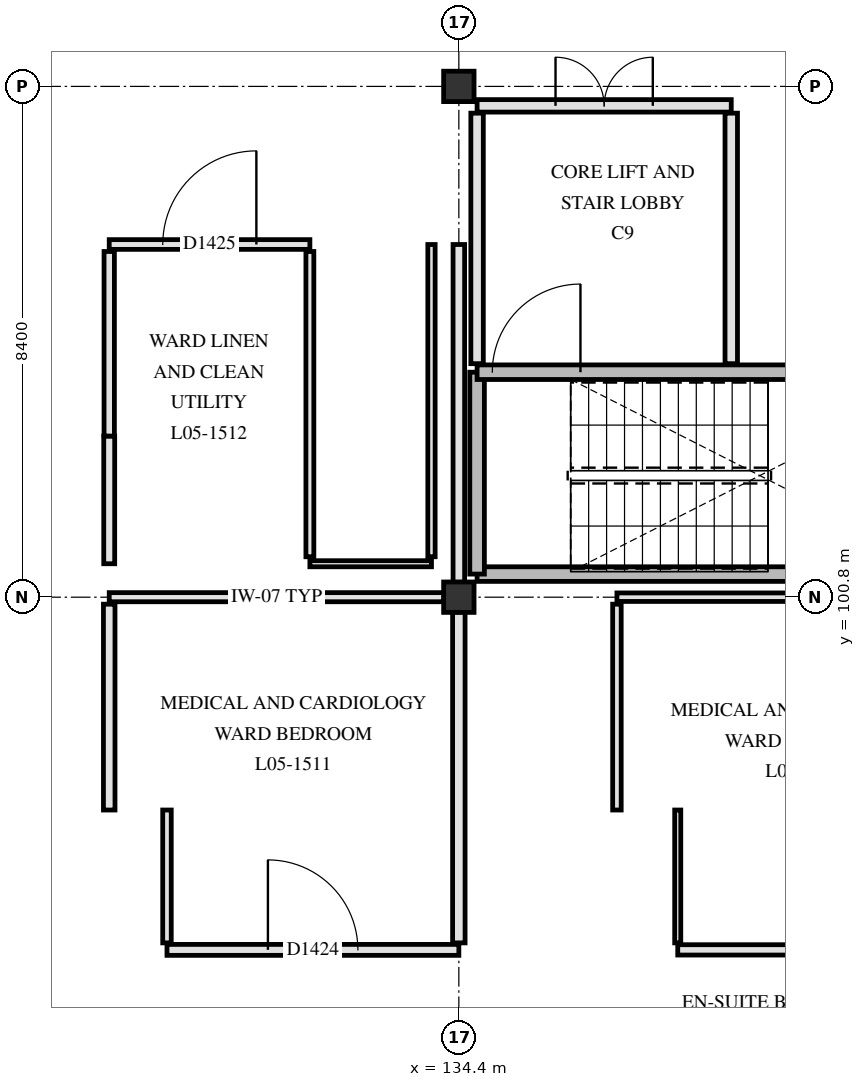
"""IFC4 building model, lengths in metres.
Left out: names, types, materials, properties, quantities, classifications, styles, units other than length and angle.
Written with IfcOpenShell. Run it as: python <this file> out.ifc"""

import sys

from ifc_helpers import new_model, si_unit, direction, frame, frame_2d, origin, origin_2d, place, context, subcontext, project, spatial, rectangle, extrude, element, fill, save


model = new_model("IFC4")
c1 = context("Model", 3, precision=1e-05, world=origin(), true_north=direction((0.0, 1.0)))
c2 = subcontext(c1, "Body", "Model", "MODEL_VIEW")
j1 = project(units=[si_unit("LENGTHUNIT", "METRE"), si_unit("PLANEANGLEUNIT", "RADIAN")], contexts=[c1])
p1 = place(None, origin())
s1 = spatial("IfcSite", under=j1, at=p1, CompositionType="ELEMENT")
p2 = place(p1, origin())
s2 = spatial("IfcBuilding", under=s1, at=p2, CompositionType="ELEMENT")
p3 = place(p2, frame((0.0, 0.0, 22.5)))
s3 = spatial("IfcBuildingStorey", under=s2, at=p3, CompositionType="ELEMENT", Elevation=22.5)
for number, where, z_axis, x_axis in (
    (1, (134.4, 100.8, 0.0), (0.0, 0.0, 1.0), (1.0, 0.0, 0.0)),
    (2, (134.4, 109.2, 0.0), (0.0, 0.0, 1.0), (1.0, 0.0, 0.0)),
):
    element("IfcColumn", number, at=place(p3, frame(where, z_axis=z_axis, x_axis=x_axis)), inside=s3, PredefinedType="COLUMN", context=c2, shape_type="SweptSolid", body=[
        extrude(rectangle(XDim=0.5, YDim=0.5, at=origin_2d()), origin(), (0.0, 0.0, 1.0), 3.9),
    ])
p4 = place(p3, frame((134.7, 101.18, 0.0), z_axis=(0.0, 0.0, 1.0), x_axis=(1.0, 0.0, 0.0)))
e3 = element("IfcWall", 3, at=p4, inside=s3, PredefinedType="SHEAR", context=c2, shape_type="SweptSolid", body=[
    extrude(rectangle(XDim=7.82, YDim=0.24, at=frame_2d((3.91, 0.0))), origin(), (0.0, 0.0, 1.0), 3.62),
])
p5 = place(p3, frame((134.7, 101.18, 0.0), z_axis=(0.0, 0.0, 1.0), x_axis=(0.0, 1.0, 0.0)))
e4 = element("IfcWall", 4, at=p5, inside=s3, PredefinedType="SHEAR", context=c2, shape_type="SweptSolid", body=[
    extrude(rectangle(XDim=3.32, YDim=0.24, at=frame_2d((1.66, 0.0))), origin(), (0.0, 0.0, 1.0), 3.62),
])
p6 = place(p3, frame((134.7, 104.5, 0.0), z_axis=(0.0, 0.0, 1.0), x_axis=(1.0, 0.0, 0.0)))
e5 = element("IfcWall", 5, at=p6, inside=s3, PredefinedType="SHEAR", context=c2, shape_type="SweptSolid", body=[
    extrude(rectangle(XDim=7.82, YDim=0.24, at=frame_2d((3.91, 0.0))), origin(), (0.0, 0.0, 1.0), 3.62),
])
p7 = place(p6, frame((0.25, 0.0, 0.0)))
e6 = element("IfcOpeningElement", 6, at=p7, cuts=e5, PredefinedType="OPENING", context=c2, shape_type="SweptSolid", body=[
    extrude(rectangle(XDim=1.45, YDim=2.2, at=frame_2d((0.725, 1.1))), frame((0.0, 0.13, 0.0), z_axis=(0.0, -1.0, 0.0), x_axis=(1.0, 0.0, 0.0)), (0.0, 0.0, 1.0), 0.26),
])
for number, where, z_axis, x_axis in (
    (7, (138.88, 104.64, 0.0), (0.0, 0.0, 1.0), (0.0, 1.0, 0.0)),
    (8, (134.7, 104.64, 0.0), (0.0, 0.0, 1.0), (0.0, 1.0, 0.0)),
):
    element("IfcWall", number, at=place(p3, frame(where, z_axis=z_axis, x_axis=x_axis)), inside=s3, PredefinedType="PARTITIONING", context=c2, shape_type="SweptSolid", body=[
        extrude(rectangle(XDim=4.12, YDim=0.205, at=frame_2d((2.06, 0.0))), origin(), (0.0, 0.0, 1.0), 3.61),
    ])
p8 = place(p3, frame((134.7, 108.88, 0.0), z_axis=(0.0, 0.0, 1.0), x_axis=(1.0, 0.0, 0.0)))
e9 = element("IfcWall", 9, at=p8, inside=s3, PredefinedType="PARTITIONING", context=c2, shape_type="SweptSolid", body=[
    extrude(rectangle(XDim=4.18, YDim=0.205, at=frame_2d((2.09, 0.0))), origin(), (0.0, 0.0, 1.0), 3.61),
])
p9 = place(p8, frame((1.29, 0.0, 0.0)))
e10 = element("IfcOpeningElement", 10, at=p9, cuts=e9, PredefinedType="OPENING", context=c2, shape_type="SweptSolid", body=[
    extrude(rectangle(XDim=1.6, YDim=2.25, at=frame_2d((0.8, 1.125))), frame((0.0, 0.113, 0.0), z_axis=(0.0, -1.0, 0.0), x_axis=(1.0, 0.0, 0.0)), (0.0, 0.0, 1.0), 0.225),
])
p10 = place(p3, frame((129.6, 95.0, 0.0), z_axis=(0.0, 0.0, 1.0), x_axis=(1.0, 0.0, 0.0)))
e11 = element("IfcWall", 11, at=p10, inside=s3, PredefinedType="PARTITIONING", context=c2, shape_type="SweptSolid", body=[
    extrude(rectangle(XDim=4.8, YDim=0.18, at=frame_2d((2.4, 0.0))), origin(), (0.0, 0.0, 1.0), 3.3),
])
p11 = place(p10, frame((1.66, 0.0, 0.0)))
e12 = element("IfcOpeningElement", 12, at=p11, cuts=e11, PredefinedType="OPENING", context=c2, shape_type="SweptSolid", body=[
    extrude(rectangle(XDim=1.48, YDim=2.22, at=frame_2d((0.74, 1.11))), frame((0.0, 0.1, 0.0), z_axis=(0.0, -1.0, 0.0), x_axis=(1.0, 0.0, 0.0)), (0.0, 0.0, 1.0), 0.2),
])
p12 = place(p3, frame((138.0, 95.0, 0.0), z_axis=(0.0, 0.0, 1.0), x_axis=(1.0, 0.0, 0.0)))
e13 = element("IfcWall", 13, at=p12, inside=s3, PredefinedType="PARTITIONING", context=c2, shape_type="SweptSolid", body=[
    extrude(rectangle(XDim=4.8, YDim=0.17, at=frame_2d((2.4, 0.0))), origin(), (0.0, 0.0, 1.0), 3.3),
])
p13 = place(p12, frame((1.79, 0.0, 0.0)))
e14 = element("IfcOpeningElement", 14, at=p13, cuts=e13, PredefinedType="OPENING", context=c2, shape_type="SweptSolid", body=[
    extrude(rectangle(XDim=1.22, YDim=2.18, at=frame_2d((0.61, 1.09))), frame((0.0, 0.095, 0.0), z_axis=(0.0, -1.0, 0.0), x_axis=(1.0, 0.0, 0.0)), (0.0, 0.0, 1.0), 0.19),
])
p14 = place(p3, frame((128.65, 100.8, 0.0), z_axis=(0.0, 0.0, 1.0), x_axis=(1.0, 0.0, 0.0)))
e15 = element("IfcWall", 15, at=p14, inside=s3, PredefinedType="PARTITIONING", context=c2, shape_type="SweptSolid", body=[
    extrude(rectangle(XDim=5.505, YDim=0.15, at=frame_2d((2.752, 0.0))), origin(), (0.0, 0.0, 1.0), 3.16),
])
p15 = place(p3, frame((137.0, 100.8, 0.0), z_axis=(0.0, 0.0, 1.0), x_axis=(1.0, 0.0, 0.0)))
e16 = element("IfcWall", 16, at=p15, inside=s3, PredefinedType="PARTITIONING", context=c2, shape_type="SweptSolid", body=[
    extrude(rectangle(XDim=5.555, YDim=0.14, at=frame_2d((2.777, 0.0))), origin(), (0.0, 0.0, 1.0), 3.16),
])
p16 = place(p3, frame((131.95, 101.35, 0.0), z_axis=(0.0, 0.0, 1.0), x_axis=(1.0, 0.0, 0.0)))
e17 = element("IfcWall", 17, at=p16, inside=s3, PredefinedType="PARTITIONING", context=c2, shape_type="SweptSolid", body=[
    extrude(rectangle(XDim=2.0, YDim=0.1, at=frame_2d((1.0, 0.0))), origin(), (0.0, 0.0, 1.0), 3.61),
])
p17 = place(p3, frame((128.65, 106.6, 0.0), z_axis=(0.0, 0.0, 1.0), x_axis=(1.0, 0.0, 0.0)))
e18 = element("IfcWall", 18, at=p17, inside=s3, PredefinedType="PARTITIONING", context=c2, shape_type="SweptSolid", body=[
    extrude(rectangle(XDim=3.3, YDim=0.16, at=frame_2d((1.65, 0.0))), origin(), (0.0, 0.0, 1.0), 3.61),
])
p18 = place(p17, frame((0.88, 0.0, 0.0)))
e19 = element("IfcOpeningElement", 19, at=p18, cuts=e18, PredefinedType="OPENING", context=c2, shape_type="SweptSolid", body=[
    extrude(rectangle(XDim=1.54, YDim=2.24, at=frame_2d((0.77, 1.12))), frame((0.0, 0.09, 0.0), z_axis=(0.0, -1.0, 0.0), x_axis=(1.0, 0.0, 0.0)), (0.0, 0.0, 1.0), 0.18),
])
p19 = place(p3, frame((128.65, 97.3, 0.0), z_axis=(0.0, 0.0, 1.0), x_axis=(0.0, 1.0, 0.0)))
e20 = element("IfcWall", 20, at=p19, inside=s3, PredefinedType="PARTITIONING", context=c2, shape_type="SweptSolid", body=[
    extrude(rectangle(XDim=3.385, YDim=0.19, at=frame_2d((1.692, 0.0))), origin(), (0.0, 0.0, 1.0), 3.34),
])
p20 = place(p3, frame((128.65, 101.35, 0.0), z_axis=(0.0, 0.0, 1.0), x_axis=(0.0, 1.0, 0.0)))
e21 = element("IfcWall", 21, at=p20, inside=s3, PredefinedType="PARTITIONING", context=c2, shape_type="SweptSolid", body=[
    extrude(rectangle(XDim=2.1, YDim=0.18, at=frame_2d((1.05, 0.0))), origin(), (0.0, 0.0, 1.0), 3.61),
])
p21 = place(p3, frame((128.65, 103.45, 0.0), z_axis=(0.0, 0.0, 1.0), x_axis=(0.0, 1.0, 0.0)))
e22 = element("IfcWall", 22, at=p21, inside=s3, PredefinedType="PARTITIONING", context=c2, shape_type="SweptSolid", body=[
    extrude(rectangle(XDim=3.035, YDim=0.17, at=frame_2d((1.518, 0.0))), origin(), (0.0, 0.0, 1.0), 3.34),
])
p22 = place(p3, frame((129.6, 95.115, 0.0), z_axis=(0.0, 0.0, 1.0), x_axis=(0.0, 1.0, 0.0)))
e23 = element("IfcWall", 23, at=p22, inside=s3, PredefinedType="PARTITIONING", context=c2, shape_type="SweptSolid", body=[
    extrude(rectangle(XDim=2.185, YDim=0.14, at=frame_2d((1.093, 0.0))), origin(), (0.0, 0.0, 1.0), 3.34),
])
p23 = place(p3, frame((131.95, 101.465, 0.0), z_axis=(0.0, 0.0, 1.0), x_axis=(0.0, 1.0, 0.0)))
e24 = element("IfcWall", 24, at=p23, inside=s3, PredefinedType="PARTITIONING", context=c2, shape_type="SweptSolid", body=[
    extrude(rectangle(XDim=5.02, YDim=0.13, at=frame_2d((2.51, 0.0))), origin(), (0.0, 0.0, 1.0), 3.34),
])
p24 = place(p3, frame((133.95, 101.465, 0.0), z_axis=(0.0, 0.0, 1.0), x_axis=(0.0, 1.0, 0.0)))
e25 = element("IfcWall", 25, at=p24, inside=s3, PredefinedType="PARTITIONING", context=c2, shape_type="SweptSolid", body=[
    extrude(rectangle(XDim=5.135, YDim=0.12, at=frame_2d((2.567, 0.0))), origin(), (0.0, 0.0, 1.0), 3.34),
])
p25 = place(p3, frame((134.4, 95.115, 0.0), z_axis=(0.0, 0.0, 1.0), x_axis=(0.0, 1.0, 0.0)))
e26 = element("IfcWall", 26, at=p25, inside=s3, PredefinedType="PARTITIONING", context=c2, shape_type="SweptSolid", body=[
    extrude(rectangle(XDim=5.44, YDim=0.205, at=frame_2d((2.72, 0.0))), origin(), (0.0, 0.0, 1.0), 3.3),
])
p26 = place(p3, frame((134.4, 101.045, 0.0), z_axis=(0.0, 0.0, 1.0), x_axis=(0.0, 1.0, 0.0)))
e27 = element("IfcWall", 27, at=p26, inside=s3, PredefinedType="PARTITIONING", context=c2, shape_type="SweptSolid", body=[
    extrude(rectangle(XDim=5.555, YDim=0.19, at=frame_2d((2.778, 0.0))), origin(), (0.0, 0.0, 1.0), 3.3),
])
p27 = place(p3, frame((137.0, 97.3, 0.0), z_axis=(0.0, 0.0, 1.0), x_axis=(0.0, 1.0, 0.0)))
e28 = element("IfcWall", 28, at=p27, inside=s3, PredefinedType="PARTITIONING", context=c2, shape_type="SweptSolid", body=[
    extrude(rectangle(XDim=3.385, YDim=0.14, at=frame_2d((1.692, 0.0))), origin(), (0.0, 0.0, 1.0), 3.34),
])
p28 = place(p3, frame((138.0, 95.115, 0.0), z_axis=(0.0, 0.0, 1.0), x_axis=(0.0, 1.0, 0.0)))
e29 = element("IfcWall", 29, at=p28, inside=s3, PredefinedType="PARTITIONING", context=c2, shape_type="SweptSolid", body=[
    extrude(rectangle(XDim=2.185, YDim=0.1, at=frame_2d((1.093, 0.0))), origin(), (0.0, 0.0, 1.0), 3.34),
])
p29 = place(p7, origin())
e30 = element("IfcDoor", 30, at=p29, inside=s3, OperationType="SINGLE_SWING_RIGHT", PredefinedType="DOOR", context=c2, shape_type="SweptSolid", body=[
    extrude(rectangle(XDim=1.45, YDim=2.2, at=frame_2d((0.725, 1.1))), frame((0.0, 0.025, 0.0), z_axis=(0.0, -1.0, 0.0), x_axis=(1.0, 0.0, 0.0)), (0.0, 0.0, 1.0), 0.05),
])
fill(e6, e30)
p30 = place(p9, origin())
e31 = element("IfcDoor", 31, at=p30, inside=s3, OperationType="DOUBLE_SWING_LEFT", PredefinedType="DOOR", context=c2, shape_type="SweptSolid", body=[
    extrude(rectangle(XDim=1.6, YDim=2.25, at=frame_2d((0.8, 1.125))), frame((0.0, 0.025, 0.0), z_axis=(0.0, -1.0, 0.0), x_axis=(1.0, 0.0, 0.0)), (0.0, 0.0, 1.0), 0.05),
])
fill(e10, e31)
p31 = place(p11, origin())
e32 = element("IfcDoor", 32, at=p31, inside=s3, OperationType="SINGLE_SWING_LEFT", PredefinedType="DOOR", context=c2, shape_type="SweptSolid", body=[
    extrude(rectangle(XDim=1.48, YDim=2.22, at=frame_2d((0.74, 1.11))), frame((0.0, 0.025, 0.0), z_axis=(0.0, -1.0, 0.0), x_axis=(1.0, 0.0, 0.0)), (0.0, 0.0, 1.0), 0.05),
])
fill(e12, e32)
p32 = place(p18, origin())
e33 = element("IfcDoor", 33, at=p32, inside=s3, OperationType="SINGLE_SWING_RIGHT", PredefinedType="DOOR", context=c2, shape_type="SweptSolid", body=[
    extrude(rectangle(XDim=1.54, YDim=2.24, at=frame_2d((0.77, 1.12))), frame((0.0, 0.025, 0.0), z_axis=(0.0, -1.0, 0.0), x_axis=(1.0, 0.0, 0.0)), (0.0, 0.0, 1.0), 0.05),
])
fill(e19, e33)
save(model, sys.argv[1])
